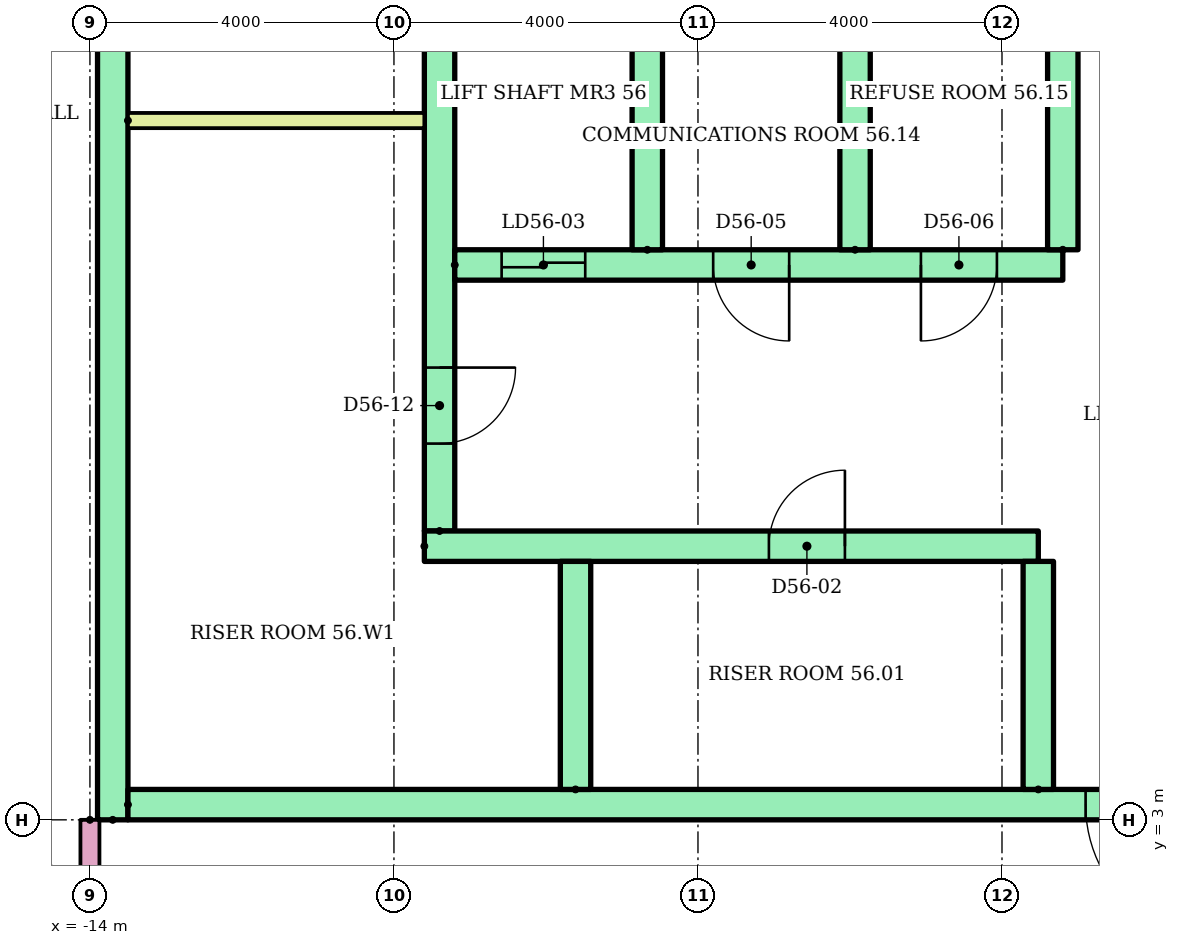
"""IFC4 building model, lengths in metres.
Left out: names, types, materials, properties, quantities, classifications, styles, units other than length and angle.
Written with IfcOpenShell. Run it as: python <this file> out.ifc"""

import sys

from ifc_helpers import new_model, si_unit, direction, frame, frame_2d, origin, place, context, subcontext, project, spatial, rectangle, extrude, element, fill, save


model = new_model("IFC4")
c1 = context("Model", 3, precision=1e-05, world=origin(), true_north=direction((0.0, 1.0)))
c2 = subcontext(c1, "Body", "Model", "MODEL_VIEW")
j1 = project(units=[si_unit("LENGTHUNIT", "METRE"), si_unit("PLANEANGLEUNIT", "RADIAN")], contexts=[c1])
p1 = place(None, origin())
s1 = spatial("IfcSite", under=j1, at=p1, CompositionType="ELEMENT")
p2 = place(p1, origin())
s2 = spatial("IfcBuilding", under=s1, at=p2, CompositionType="ELEMENT")
p3 = place(p2, frame((0.0, 0.0, 217.2)))
s3 = spatial("IfcBuildingStorey", under=s2, at=p3, CompositionType="ELEMENT", Elevation=217.2)
p4 = place(p3, frame((-13.7, 3.0, 0.0), z_axis=(0.0, 0.0, 1.0), x_axis=(0.0, 1.0, 0.0)))
e1 = element("IfcWall", 1, at=p4, inside=s3, PredefinedType="SHEAR", context=c2, shape_type="SweptSolid", body=[
    extrude(rectangle(XDim=17.0, YDim=0.4, at=frame_2d((8.5, 0.0))), origin(), (0.0, 0.0, 1.0), 2.92),
])
p5 = place(p3, frame((-9.4, 6.8, 0.0), z_axis=(0.0, 0.0, 1.0), x_axis=(0.0, 1.0, 0.0)))
e2 = element("IfcWall", 2, at=p5, inside=s3, PredefinedType="SHEAR", context=c2, shape_type="SweptSolid", body=[
    extrude(rectangle(XDim=12.7, YDim=0.4, at=frame_2d((6.35, 0.0))), origin(), (0.0, 0.0, 1.0), 2.92),
])
p6 = place(p5, frame((1.15, 0.0, 0.0)))
e3 = element("IfcOpeningElement", 3, at=p6, cuts=e2, PredefinedType="OPENING", context=c2, shape_type="SweptSolid", body=[
    extrude(rectangle(XDim=1.0, YDim=2.1, at=frame_2d((0.5, 1.05))), frame((0.0, 0.21, 0.0), z_axis=(0.0, -1.0, 0.0), x_axis=(1.0, 0.0, 0.0)), (0.0, 0.0, 1.0), 0.42),
])
p7 = place(p5, frame((7.925, 0.0, 0.0)))
e4 = element("IfcOpeningElement", 4, at=p7, cuts=e2, PredefinedType="OPENING", context=c2, shape_type="SweptSolid", body=[
    extrude(rectangle(XDim=1.0, YDim=2.1, at=frame_2d((0.5, 1.05))), frame((0.0, 0.21, 0.0), z_axis=(0.0, -1.0, 0.0), x_axis=(1.0, 0.0, 0.0)), (0.0, 0.0, 1.0), 0.42),
])
p8 = place(p3, frame((-13.5, 3.2, 0.0)))
e5 = element("IfcWall", 5, at=p8, inside=s3, PredefinedType="SHEAR", context=c2, shape_type="SweptSolid", body=[
    extrude(rectangle(XDim=27.0, YDim=0.4, at=frame_2d((13.5, 0.0))), origin(), (0.0, 0.0, 1.0), 2.92),
])
p9 = place(p8, frame((22.083, 0.0, 0.0)))
e6 = element("IfcOpeningElement", 6, at=p9, cuts=e5, PredefinedType="OPENING", context=c2, shape_type="SweptSolid", body=[
    extrude(rectangle(XDim=1.1, YDim=2.1, at=frame_2d((0.55, 1.05))), frame((0.0, 0.21, 0.0), z_axis=(0.0, -1.0, 0.0), x_axis=(1.0, 0.0, 0.0)), (0.0, 0.0, 1.0), 0.42),
])
p10 = place(p8, frame((25.128, 0.0, 0.0)))
e7 = element("IfcOpeningElement", 7, at=p10, cuts=e5, PredefinedType="OPENING", context=c2, shape_type="SweptSolid", body=[
    extrude(rectangle(XDim=1.1, YDim=2.1, at=frame_2d((0.55, 1.05))), frame((0.0, 0.21, 0.0), z_axis=(0.0, -1.0, 0.0), x_axis=(1.0, 0.0, 0.0)), (0.0, 0.0, 1.0), 0.42),
])
p11 = place(p8, frame((12.6, 0.0, 0.0)))
e8 = element("IfcOpeningElement", 8, at=p11, cuts=e5, PredefinedType="OPENING", context=c2, shape_type="SweptSolid", body=[
    extrude(rectangle(XDim=1.8, YDim=2.1, at=frame_2d((0.9, 1.05))), frame((0.0, 0.21, 0.0), z_axis=(0.0, -1.0, 0.0), x_axis=(1.0, 0.0, 0.0)), (0.0, 0.0, 1.0), 0.42),
])
p12 = place(p3, frame((-9.6, 6.6, 0.0)))
e9 = element("IfcWall", 9, at=p12, inside=s3, PredefinedType="SHEAR", context=c2, shape_type="SweptSolid", body=[
    extrude(rectangle(XDim=8.078, YDim=0.4, at=frame_2d((4.039, 0.0))), origin(), (0.0, 0.0, 1.0), 2.92),
])
p13 = place(p12, frame((4.533, 0.0, 0.0)))
e10 = element("IfcOpeningElement", 10, at=p13, cuts=e9, PredefinedType="OPENING", context=c2, shape_type="SweptSolid", body=[
    extrude(rectangle(XDim=1.0, YDim=2.1, at=frame_2d((0.5, 1.05))), frame((0.0, 0.21, 0.0), z_axis=(0.0, -1.0, 0.0), x_axis=(1.0, 0.0, 0.0)), (0.0, 0.0, 1.0), 0.42),
])
for number, where, z_axis, x_axis in (
    (11, (-7.611, 3.4, 0.0), (0.0, 0.0, 1.0), (0.0, 1.0, 0.0)),
    (12, (-1.522, 3.4, 0.0), (0.0, 0.0, 1.0), (0.0, 1.0, 0.0)),
):
    element("IfcWall", number, at=place(p3, frame(where, z_axis=z_axis, x_axis=x_axis)), inside=s3, PredefinedType="SHEAR", context=c2, shape_type="SweptSolid", body=[
        extrude(rectangle(XDim=3.0, YDim=0.4, at=frame_2d((1.5, 0.0))), origin(), (0.0, 0.0, 1.0), 2.92),
    ])
p14 = place(p3, frame((-9.2, 10.3, 0.0)))
e13 = element("IfcWall", 13, at=p14, inside=s3, PredefinedType="SHEAR", context=c2, shape_type="SweptSolid", body=[
    extrude(rectangle(XDim=8.0, YDim=0.4, at=frame_2d((4.0, 0.0))), origin(), (0.0, 0.0, 1.0), 2.92),
])
p15 = place(p14, frame((0.617, 0.0, 0.0)))
e14 = element("IfcOpeningElement", 14, at=p15, cuts=e13, PredefinedType="OPENING", context=c2, shape_type="SweptSolid", body=[
    extrude(rectangle(XDim=1.1, YDim=2.1, at=frame_2d((0.55, 1.05))), frame((0.0, 0.21, 0.0), z_axis=(0.0, -1.0, 0.0), x_axis=(1.0, 0.0, 0.0)), (0.0, 0.0, 1.0), 0.42),
])
p16 = place(p14, frame((3.4, 0.0, 0.0)))
e15 = element("IfcOpeningElement", 15, at=p16, cuts=e13, PredefinedType="OPENING", context=c2, shape_type="SweptSolid", body=[
    extrude(rectangle(XDim=1.0, YDim=2.1, at=frame_2d((0.5, 1.05))), frame((0.0, 0.21, 0.0), z_axis=(0.0, -1.0, 0.0), x_axis=(1.0, 0.0, 0.0)), (0.0, 0.0, 1.0), 0.42),
])
p17 = place(p14, frame((6.133, 0.0, 0.0)))
e16 = element("IfcOpeningElement", 16, at=p17, cuts=e13, PredefinedType="OPENING", context=c2, shape_type="SweptSolid", body=[
    extrude(rectangle(XDim=1.0, YDim=2.1, at=frame_2d((0.5, 1.05))), frame((0.0, 0.21, 0.0), z_axis=(0.0, -1.0, 0.0), x_axis=(1.0, 0.0, 0.0)), (0.0, 0.0, 1.0), 0.42),
])
for number, where, z_axis, x_axis in (
    (17, (-6.667, 10.5, 0.0), (0.0, 0.0, 1.0), (0.0, 1.0, 0.0)),
    (18, (-3.933, 10.5, 0.0), (0.0, 0.0, 1.0), (0.0, 1.0, 0.0)),
    (19, (-1.2, 10.5, 0.0), (0.0, 0.0, 1.0), (0.0, 1.0, 0.0)),
):
    element("IfcWall", number, at=place(p3, frame(where, z_axis=z_axis, x_axis=x_axis)), inside=s3, PredefinedType="SHEAR", context=c2, shape_type="SweptSolid", body=[
        extrude(rectangle(XDim=3.0, YDim=0.4, at=frame_2d((1.5, 0.0))), origin(), (0.0, 0.0, 1.0), 2.92),
    ])
p18 = place(p3, frame((-13.5, 12.2, 0.0)))
e20 = element("IfcWall", 20, at=p18, inside=s3, PredefinedType="PARTITIONING", context=c2, shape_type="SweptSolid", body=[
    extrude(rectangle(XDim=3.9, YDim=0.2, at=frame_2d((1.95, 0.0))), origin(), (0.0, 0.0, 1.0), 2.92),
])
p19 = place(p3, frame((-14.0, 3.0, 0.0), z_axis=(0.0, 0.0, 1.0), x_axis=(0.0, -1.0, 0.0)))
e21 = element("IfcWall", 21, at=p19, inside=s3, PredefinedType="PARTITIONING", context=c2, shape_type="SweptSolid", body=[
    extrude(rectangle(XDim=1.6, YDim=0.25, at=frame_2d((0.8, 0.0))), origin(), (0.0, 0.0, 1.0), 2.4),
])
p20 = place(p11, frame((1.8, 0.0, 0.0), z_axis=(0.0, 0.0, 1.0), x_axis=(-1.0, 0.0, 0.0)))
e22 = element("IfcDoor", 22, at=p20, inside=s3, OperationType="DOUBLE_DOOR_SINGLE_SWING", PredefinedType="DOOR", context=c2, shape_type="SweptSolid", body=[
    extrude(rectangle(XDim=1.8, YDim=2.1, at=frame_2d((0.9, 1.05))), frame((0.0, 0.025, 0.0), z_axis=(0.0, -1.0, 0.0), x_axis=(1.0, 0.0, 0.0)), (0.0, 0.0, 1.0), 0.05),
])
fill(e8, e22)
p21 = place(p13, origin())
e23 = element("IfcDoor", 23, at=p21, inside=s3, OperationType="SINGLE_SWING_RIGHT", PredefinedType="DOOR", context=c2, shape_type="SweptSolid", body=[
    extrude(rectangle(XDim=1.0, YDim=2.1, at=frame_2d((0.5, 1.05))), frame((0.0, 0.025, 0.0), z_axis=(0.0, -1.0, 0.0), x_axis=(1.0, 0.0, 0.0)), (0.0, 0.0, 1.0), 0.05),
])
fill(e10, e23)
p22 = place(p15, origin())
e24 = element("IfcDoor", 24, at=p22, inside=s3, OperationType="SLIDING_TO_LEFT", PredefinedType="DOOR", context=c2, shape_type="SweptSolid", body=[
    extrude(rectangle(XDim=1.1, YDim=2.1, at=frame_2d((0.55, 1.05))), frame((0.0, 0.025, 0.0), z_axis=(0.0, -1.0, 0.0), x_axis=(1.0, 0.0, 0.0)), (0.0, 0.0, 1.0), 0.05),
])
fill(e14, e24)
p23 = place(p16, frame((1.0, 0.0, 0.0), z_axis=(0.0, 0.0, 1.0), x_axis=(-1.0, 0.0, 0.0)))
e25 = element("IfcDoor", 25, at=p23, inside=s3, OperationType="SINGLE_SWING_RIGHT", PredefinedType="DOOR", context=c2, shape_type="SweptSolid", body=[
    extrude(rectangle(XDim=1.0, YDim=2.1, at=frame_2d((0.5, 1.05))), frame((0.0, 0.025, 0.0), z_axis=(0.0, -1.0, 0.0), x_axis=(1.0, 0.0, 0.0)), (0.0, 0.0, 1.0), 0.05),
])
fill(e15, e25)
p24 = place(p17, frame((1.0, 0.0, 0.0), z_axis=(0.0, 0.0, 1.0), x_axis=(-1.0, 0.0, 0.0)))
e26 = element("IfcDoor", 26, at=p24, inside=s3, OperationType="SINGLE_SWING_LEFT", PredefinedType="DOOR", context=c2, shape_type="SweptSolid", body=[
    extrude(rectangle(XDim=1.0, YDim=2.1, at=frame_2d((0.5, 1.05))), frame((0.0, 0.025, 0.0), z_axis=(0.0, -1.0, 0.0), x_axis=(1.0, 0.0, 0.0)), (0.0, 0.0, 1.0), 0.05),
])
fill(e16, e26)
p25 = place(p6, frame((1.0, 0.0, 0.0), z_axis=(0.0, 0.0, 1.0), x_axis=(-1.0, 0.0, 0.0)))
e27 = element("IfcDoor", 27, at=p25, inside=s3, OperationType="SINGLE_SWING_RIGHT", PredefinedType="DOOR", context=c2, shape_type="SweptSolid", body=[
    extrude(rectangle(XDim=1.0, YDim=2.1, at=frame_2d((0.5, 1.05))), frame((0.0, 0.025, 0.0), z_axis=(0.0, -1.0, 0.0), x_axis=(1.0, 0.0, 0.0)), (0.0, 0.0, 1.0), 0.05),
])
fill(e3, e27)
save(model, sys.argv[1])
